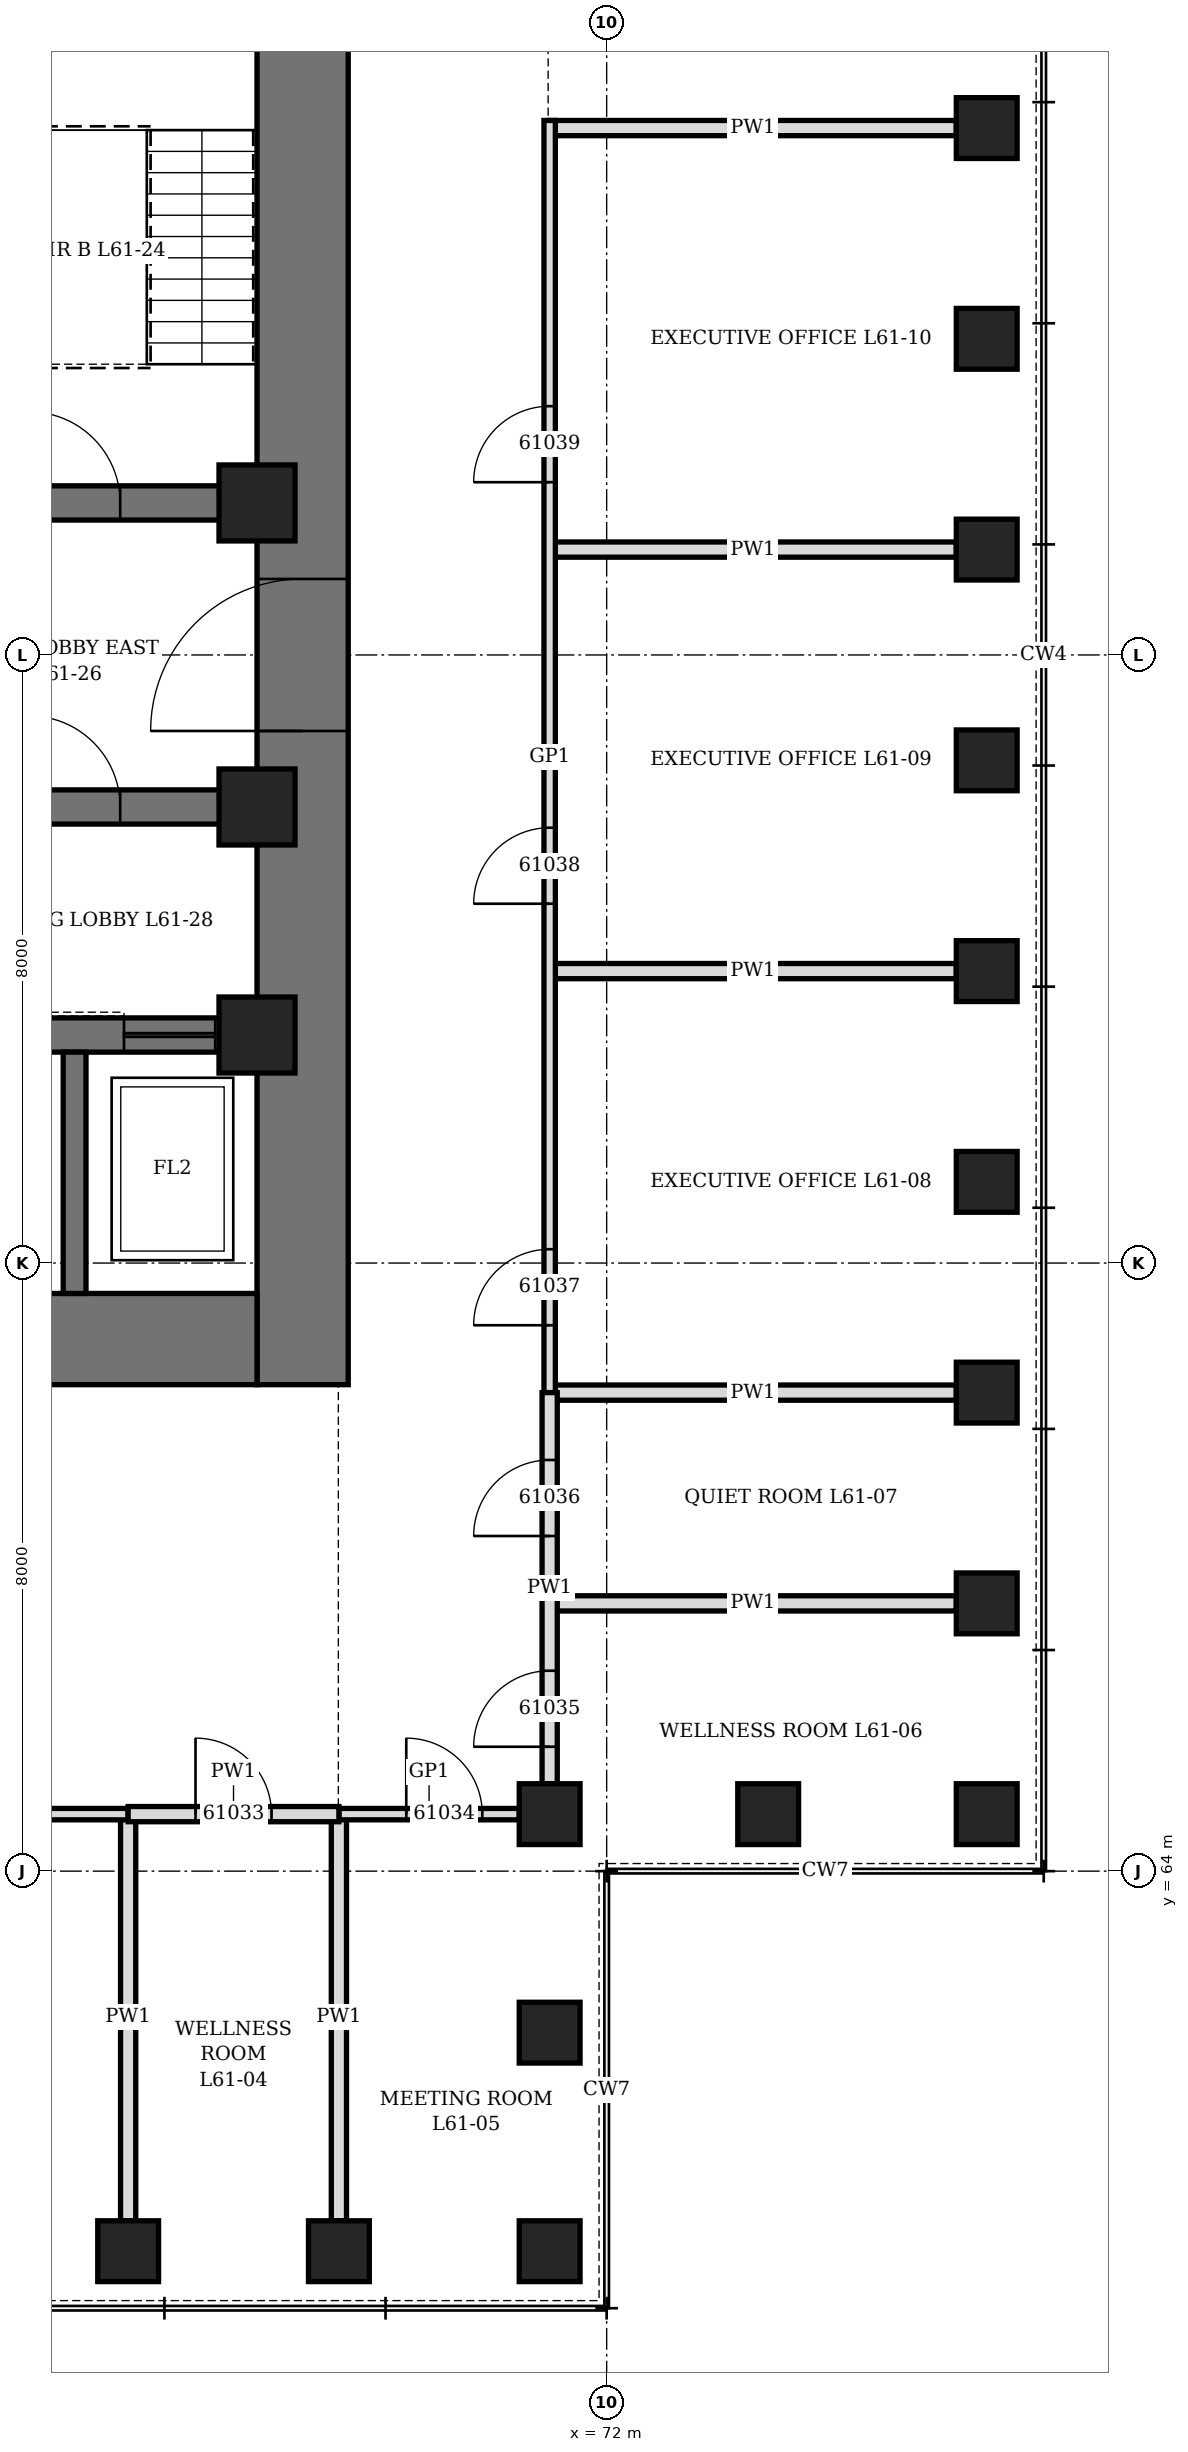
"""IFC4 building model, lengths in metres.
Left out: names, types, materials, properties, quantities, classifications, styles, units other than length and angle.
Written with IfcOpenShell. Run it as: python <this file> out.ifc"""

import sys

from ifc_helpers import new_model, si_unit, direction, frame, frame_2d, origin, origin_2d, place, context, subcontext, project, spatial, rectangle, hollow_rectangle, extrude, element, fill, save


model = new_model("IFC4")
c1 = context("Model", 3, precision=1e-05, world=origin(), true_north=direction((0.0, 1.0)))
c2 = subcontext(c1, "Body", "Model", "MODEL_VIEW")
j1 = project(units=[si_unit("LENGTHUNIT", "METRE"), si_unit("PLANEANGLEUNIT", "RADIAN")], contexts=[c1])
p1 = place(None, origin())
s1 = spatial("IfcSite", under=j1, at=p1, CompositionType="ELEMENT")
p2 = place(p1, origin())
s2 = spatial("IfcBuilding", under=s1, at=p2, CompositionType="ELEMENT")
p3 = place(p2, frame((0.0, 0.0, 271.3)))
s3 = spatial("IfcBuildingStorey", under=s2, at=p3, CompositionType="ELEMENT", Elevation=271.3)
for number, where, z_axis, x_axis in (
    (1, (65.705, 59.0, 0.0), (0.0, 0.0, 1.0), (1.0, 0.0, 0.0)),
    (2, (68.477, 59.0, 0.0), (0.0, 0.0, 1.0), (1.0, 0.0, 0.0)),
    (3, (71.25, 59.0, 0.0), (0.0, 0.0, 1.0), (0.0, 1.0, 0.0)),
    (4, (71.25, 61.875, 0.0), (0.0, 0.0, 1.0), (0.0, 1.0, 0.0)),
    (5, (71.25, 64.75, 0.0), (0.0, 0.0, 1.0), (1.0, 0.0, 0.0)),
    (6, (74.125, 64.75, 0.0), (0.0, 0.0, 1.0), (1.0, 0.0, 0.0)),
    (7, (77.0, 64.75, 0.0), (0.0, 0.0, 1.0), (0.0, 1.0, 0.0)),
    (8, (77.0, 67.523, 0.0), (0.0, 0.0, 1.0), (0.0, 1.0, 0.0)),
    (9, (77.0, 70.295, 0.0), (0.0, 0.0, 1.0), (0.0, 1.0, 0.0)),
    (10, (77.0, 73.068, 0.0), (0.0, 0.0, 1.0), (0.0, 1.0, 0.0)),
    (11, (77.0, 75.841, 0.0), (0.0, 0.0, 1.0), (0.0, 1.0, 0.0)),
    (12, (77.0, 78.614, 0.0), (0.0, 0.0, 1.0), (0.0, 1.0, 0.0)),
    (13, (77.0, 81.386, 0.0), (0.0, 0.0, 1.0), (0.0, 1.0, 0.0)),
    (14, (77.0, 84.159, 0.0), (0.0, 0.0, 1.0), (0.0, 1.0, 0.0)),
    (15, (77.0, 86.932, 0.0), (0.0, 0.0, 1.0), (0.0, 1.0, 0.0)),
):
    element("IfcColumn", number, at=place(p3, frame(where, z_axis=z_axis, x_axis=x_axis)), inside=s3, PredefinedType="COLUMN", context=c2, shape_type="SweptSolid", body=[
        extrude(hollow_rectangle(XDim=0.8, YDim=0.8, WallThickness=0.1, at=origin_2d()), origin(), (0.0, 0.0, 1.0), 4.2),
    ])
p4 = place(p3, frame((68.0, 70.4, 0.0), z_axis=(0.0, 0.0, 1.0), x_axis=(0.0, 1.0, 0.0)))
e16 = element("IfcWall", 16, at=p4, inside=s3, PredefinedType="SHEAR", context=c2, shape_type="SweptSolid", body=[
    extrude(rectangle(XDim=19.2, YDim=1.2, at=frame_2d((9.6, 0.0))), origin(), (0.0, 0.0, 1.0), 4.2),
])
p5 = place(p4, frame((8.6, 0.0, 0.0)))
e17 = element("IfcOpeningElement", 17, at=p5, cuts=e16, PredefinedType="OPENING", context=c2, shape_type="SweptSolid", body=[
    extrude(rectangle(XDim=2.0, YDim=2.4, at=frame_2d((1.0, 1.2))), frame((0.0, 0.61, 0.0), z_axis=(0.0, -1.0, 0.0), x_axis=(1.0, 0.0, 0.0)), (0.0, 0.0, 1.0), 1.22),
])
p6 = place(p3, frame((44.6, 71.0, 0.0), z_axis=(0.0, 0.0, 1.0), x_axis=(1.0, 0.0, 0.0)))
e18 = element("IfcWall", 18, at=p6, inside=s3, PredefinedType="SHEAR", context=c2, shape_type="SweptSolid", body=[
    extrude(rectangle(XDim=22.8, YDim=1.2, at=frame_2d((11.4, 0.0))), origin(), (0.0, 0.0, 1.0), 4.2),
])
p7 = place(p6, frame((6.35, 0.0, 0.0)))
e19 = element("IfcOpeningElement", 19, at=p7, cuts=e18, PredefinedType="OPENING", context=c2, shape_type="SweptSolid", body=[
    extrude(rectangle(XDim=1.1, YDim=2.2, at=frame_2d((0.55, 1.1))), frame((0.0, 0.61, 0.0), z_axis=(0.0, -1.0, 0.0), x_axis=(1.0, 0.0, 0.0)), (0.0, 0.0, 1.0), 1.22),
])
p8 = place(p6, frame((9.35, 0.0, 0.0)))
e20 = element("IfcOpeningElement", 20, at=p8, cuts=e18, PredefinedType="OPENING", context=c2, shape_type="SweptSolid", body=[
    extrude(rectangle(XDim=1.1, YDim=2.2, at=frame_2d((0.55, 1.1))), frame((0.0, 0.61, 0.0), z_axis=(0.0, -1.0, 0.0), x_axis=(1.0, 0.0, 0.0)), (0.0, 0.0, 1.0), 1.22),
])
p9 = place(p6, frame((12.35, 0.0, 0.0)))
e21 = element("IfcOpeningElement", 21, at=p9, cuts=e18, PredefinedType="OPENING", context=c2, shape_type="SweptSolid", body=[
    extrude(rectangle(XDim=1.1, YDim=2.2, at=frame_2d((0.55, 1.1))), frame((0.0, 0.61, 0.0), z_axis=(0.0, -1.0, 0.0), x_axis=(1.0, 0.0, 0.0)), (0.0, 0.0, 1.0), 1.22),
])
p10 = place(p6, frame((15.35, 0.0, 0.0)))
e22 = element("IfcOpeningElement", 22, at=p10, cuts=e18, PredefinedType="OPENING", context=c2, shape_type="SweptSolid", body=[
    extrude(rectangle(XDim=1.1, YDim=2.2, at=frame_2d((0.55, 1.1))), frame((0.0, 0.61, 0.0), z_axis=(0.0, -1.0, 0.0), x_axis=(1.0, 0.0, 0.0)), (0.0, 0.0, 1.0), 1.22),
])
p11 = place(p3, frame((62.225, 75.0, 0.0), z_axis=(0.0, 0.0, 1.0), x_axis=(1.0, 0.0, 0.0)))
e23 = element("IfcWall", 23, at=p11, inside=s3, PredefinedType="SHEAR", context=c2, shape_type="SweptSolid", body=[
    extrude(rectangle(XDim=5.175, YDim=0.45, at=frame_2d((2.587, 0.0))), origin(), (0.0, 0.0, 1.0), 4.2),
])
p12 = place(p11, frame((0.675, 0.0, 0.0)))
e24 = element("IfcOpeningElement", 24, at=p12, cuts=e23, PredefinedType="OPENING", context=c2, shape_type="SweptSolid", body=[
    extrude(rectangle(XDim=1.2, YDim=2.2, at=frame_2d((0.6, 1.1))), frame((0.0, 0.235, 0.0), z_axis=(0.0, -1.0, 0.0), x_axis=(1.0, 0.0, 0.0)), (0.0, 0.0, 1.0), 0.47),
])
p13 = place(p11, frame((3.425, 0.0, 0.0)))
e25 = element("IfcOpeningElement", 25, at=p13, cuts=e23, PredefinedType="OPENING", context=c2, shape_type="SweptSolid", body=[
    extrude(rectangle(XDim=1.2, YDim=2.2, at=frame_2d((0.6, 1.1))), frame((0.0, 0.235, 0.0), z_axis=(0.0, -1.0, 0.0), x_axis=(1.0, 0.0, 0.0)), (0.0, 0.0, 1.0), 0.47),
])
p14 = place(p3, frame((62.225, 78.0, 0.0), z_axis=(0.0, 0.0, 1.0), x_axis=(1.0, 0.0, 0.0)))
e26 = element("IfcWall", 26, at=p14, inside=s3, PredefinedType="SHEAR", context=c2, shape_type="SweptSolid", body=[
    extrude(rectangle(XDim=5.175, YDim=0.45, at=frame_2d((2.587, 0.0))), origin(), (0.0, 0.0, 1.0), 4.2),
])
p15 = place(p14, frame((2.175, 0.0, 0.0)))
e27 = element("IfcOpeningElement", 27, at=p15, cuts=e26, PredefinedType="OPENING", context=c2, shape_type="SweptSolid", body=[
    extrude(rectangle(XDim=1.2, YDim=2.1, at=frame_2d((0.6, 1.05))), frame((0.0, 0.235, 0.0), z_axis=(0.0, -1.0, 0.0), x_axis=(1.0, 0.0, 0.0)), (0.0, 0.0, 1.0), 0.47),
])
p16 = place(p3, frame((62.225, 82.0, 0.0), z_axis=(0.0, 0.0, 1.0), x_axis=(1.0, 0.0, 0.0)))
e28 = element("IfcWall", 28, at=p16, inside=s3, PredefinedType="SHEAR", context=c2, shape_type="SweptSolid", body=[
    extrude(rectangle(XDim=5.175, YDim=0.45, at=frame_2d((2.587, 0.0))), origin(), (0.0, 0.0, 1.0), 4.2),
])
p17 = place(p16, frame((2.175, 0.0, 0.0)))
e29 = element("IfcOpeningElement", 29, at=p17, cuts=e28, PredefinedType="OPENING", context=c2, shape_type="SweptSolid", body=[
    extrude(rectangle(XDim=1.2, YDim=2.1, at=frame_2d((0.6, 1.05))), frame((0.0, 0.235, 0.0), z_axis=(0.0, -1.0, 0.0), x_axis=(1.0, 0.0, 0.0)), (0.0, 0.0, 1.0), 0.47),
])
p18 = place(p3, frame((65.0, 71.6, 0.0), z_axis=(0.0, 0.0, 1.0), x_axis=(0.0, 1.0, 0.0)))
e30 = element("IfcWall", 30, at=p18, inside=s3, PredefinedType="SHEAR", context=c2, shape_type="SweptSolid", body=[
    extrude(rectangle(XDim=3.175, YDim=0.3, at=frame_2d((1.587, 0.0))), origin(), (0.0, 0.0, 1.0), 4.2),
])
for number, where, z_axis, x_axis in (
    (31, (67.4, 75.0, 0.0), (0.0, 0.0, 1.0), (1.0, 0.0, 0.0)),
    (32, (67.4, 78.0, 0.0), (0.0, 0.0, 1.0), (1.0, 0.0, 0.0)),
    (33, (67.4, 82.0, 0.0), (0.0, 0.0, 1.0), (1.0, 0.0, 0.0)),
):
    element("IfcColumn", number, at=place(p3, frame(where, z_axis=z_axis, x_axis=x_axis)), inside=s3, PredefinedType="COLUMN", context=c2, shape_type="SweptSolid", body=[
        extrude(hollow_rectangle(XDim=1.0, YDim=1.0, WallThickness=0.15, at=origin_2d()), origin(), (0.0, 0.0, 1.0), 4.2),
    ])
for number, where, z_axis, x_axis in (
    (34, (65.705, 59.4, 0.0), (0.0, 0.0, 1.0), (0.0, 1.0, 0.0)),
    (35, (68.477, 59.4, 0.0), (0.0, 0.0, 1.0), (0.0, 1.0, 0.0)),
    (36, (71.25, 67.523, 0.0), (0.0, 0.0, 1.0), (1.0, 0.0, 0.0)),
    (37, (71.25, 70.295, 0.0), (0.0, 0.0, 1.0), (1.0, 0.0, 0.0)),
    (38, (71.25, 75.841, 0.0), (0.0, 0.0, 1.0), (1.0, 0.0, 0.0)),
    (39, (71.25, 81.386, 0.0), (0.0, 0.0, 1.0), (1.0, 0.0, 0.0)),
    (40, (71.25, 86.932, 0.0), (0.0, 0.0, 1.0), (1.0, 0.0, 0.0)),
):
    element("IfcWall", number, at=place(p3, frame(where, z_axis=z_axis, x_axis=x_axis)), inside=s3, PredefinedType="PARTITIONING", context=c2, shape_type="SweptSolid", body=[
        extrude(rectangle(XDim=5.35, YDim=0.2, at=frame_2d((2.675, 0.0))), origin(), (0.0, 0.0, 1.0), 3.428),
    ])
p19 = place(p3, frame((60.059, 64.75, 0.0), z_axis=(0.0, 0.0, 1.0), x_axis=(1.0, 0.0, 0.0)))
e41 = element("IfcWall", 41, at=p19, inside=s3, PredefinedType="PARTITIONING", context=c2, shape_type="SweptSolid", body=[
    extrude(rectangle(XDim=5.646, YDim=0.15, at=frame_2d((2.823, 0.0))), origin(), (0.0, 0.0, 1.0), 4.04),
])
p20 = place(p19, frame((0.986, 0.0, 0.0)))
e42 = element("IfcOpeningElement", 42, at=p20, cuts=e41, PredefinedType="OPENING", context=c2, shape_type="SweptSolid", body=[
    extrude(rectangle(XDim=1.0, YDim=2.1, at=frame_2d((0.5, 1.05))), frame((0.0, 0.085, 0.0), z_axis=(0.0, -1.0, 0.0), x_axis=(1.0, 0.0, 0.0)), (0.0, 0.0, 1.0), 0.17),
])
p21 = place(p3, frame((68.477, 64.75, 0.0), z_axis=(0.0, 0.0, 1.0), x_axis=(1.0, 0.0, 0.0)))
e43 = element("IfcWall", 43, at=p21, inside=s3, PredefinedType="PARTITIONING", context=c2, shape_type="SweptSolid", body=[
    extrude(rectangle(XDim=2.373, YDim=0.15, at=frame_2d((1.187, 0.0))), origin(), (0.0, 0.0, 1.0), 4.04),
])
p22 = place(p21, frame((0.886, 0.0, 0.0)))
e44 = element("IfcOpeningElement", 44, at=p22, cuts=e43, PredefinedType="OPENING", context=c2, shape_type="SweptSolid", body=[
    extrude(rectangle(XDim=1.0, YDim=2.4, at=frame_2d((0.5, 1.2))), frame((0.0, 0.085, 0.0), z_axis=(0.0, -1.0, 0.0), x_axis=(1.0, 0.0, 0.0)), (0.0, 0.0, 1.0), 0.17),
])
p23 = place(p3, frame((65.705, 64.75, 0.0), z_axis=(0.0, 0.0, 1.0), x_axis=(1.0, 0.0, 0.0)))
e45 = element("IfcWall", 45, at=p23, inside=s3, PredefinedType="PARTITIONING", context=c2, shape_type="SweptSolid", body=[
    extrude(rectangle(XDim=2.773, YDim=0.2, at=frame_2d((1.386, 0.0))), origin(), (0.0, 0.0, 1.0), 4.04),
])
p24 = place(p23, frame((0.886, 0.0, 0.0)))
e46 = element("IfcOpeningElement", 46, at=p24, cuts=e45, PredefinedType="OPENING", context=c2, shape_type="SweptSolid", body=[
    extrude(rectangle(XDim=1.0, YDim=2.1, at=frame_2d((0.5, 1.05))), frame((0.0, 0.11, 0.0), z_axis=(0.0, -1.0, 0.0), x_axis=(1.0, 0.0, 0.0)), (0.0, 0.0, 1.0), 0.22),
])
p25 = place(p3, frame((71.25, 70.295, 0.0), z_axis=(0.0, 0.0, 1.0), x_axis=(0.0, 1.0, 0.0)))
e47 = element("IfcWall", 47, at=p25, inside=s3, PredefinedType="PARTITIONING", context=c2, shape_type="SweptSolid", body=[
    extrude(rectangle(XDim=16.736, YDim=0.15, at=frame_2d((8.368, 0.0))), origin(), (0.0, 0.0, 1.0), 4.04),
])
p26 = place(p25, frame((0.886, 0.0, 0.0)))
e48 = element("IfcOpeningElement", 48, at=p26, cuts=e47, PredefinedType="OPENING", context=c2, shape_type="SweptSolid", body=[
    extrude(rectangle(XDim=1.0, YDim=2.1, at=frame_2d((0.5, 1.05))), frame((0.0, 0.085, 0.0), z_axis=(0.0, -1.0, 0.0), x_axis=(1.0, 0.0, 0.0)), (0.0, 0.0, 1.0), 0.17),
])
p27 = place(p25, frame((6.432, 0.0, 0.0)))
e49 = element("IfcOpeningElement", 49, at=p27, cuts=e47, PredefinedType="OPENING", context=c2, shape_type="SweptSolid", body=[
    extrude(rectangle(XDim=1.0, YDim=2.1, at=frame_2d((0.5, 1.05))), frame((0.0, 0.085, 0.0), z_axis=(0.0, -1.0, 0.0), x_axis=(1.0, 0.0, 0.0)), (0.0, 0.0, 1.0), 0.17),
])
p28 = place(p25, frame((11.977, 0.0, 0.0)))
e50 = element("IfcOpeningElement", 50, at=p28, cuts=e47, PredefinedType="OPENING", context=c2, shape_type="SweptSolid", body=[
    extrude(rectangle(XDim=1.0, YDim=2.1, at=frame_2d((0.5, 1.05))), frame((0.0, 0.085, 0.0), z_axis=(0.0, -1.0, 0.0), x_axis=(1.0, 0.0, 0.0)), (0.0, 0.0, 1.0), 0.17),
])
p29 = place(p3, frame((71.25, 65.15, 0.0), z_axis=(0.0, 0.0, 1.0), x_axis=(0.0, 1.0, 0.0)))
e51 = element("IfcWall", 51, at=p29, inside=s3, PredefinedType="PARTITIONING", context=c2, shape_type="SweptSolid", body=[
    extrude(rectangle(XDim=5.146, YDim=0.2, at=frame_2d((2.573, 0.0))), origin(), (0.0, 0.0, 1.0), 4.04),
])
p30 = place(p29, frame((0.486, 0.0, 0.0)))
e52 = element("IfcOpeningElement", 52, at=p30, cuts=e51, PredefinedType="OPENING", context=c2, shape_type="SweptSolid", body=[
    extrude(rectangle(XDim=1.0, YDim=2.1, at=frame_2d((0.5, 1.05))), frame((0.0, 0.11, 0.0), z_axis=(0.0, -1.0, 0.0), x_axis=(1.0, 0.0, 0.0)), (0.0, 0.0, 1.0), 0.22),
])
p31 = place(p29, frame((3.259, 0.0, 0.0)))
e53 = element("IfcOpeningElement", 53, at=p31, cuts=e51, PredefinedType="OPENING", context=c2, shape_type="SweptSolid", body=[
    extrude(rectangle(XDim=1.0, YDim=2.1, at=frame_2d((0.5, 1.05))), frame((0.0, 0.11, 0.0), z_axis=(0.0, -1.0, 0.0), x_axis=(1.0, 0.0, 0.0)), (0.0, 0.0, 1.0), 0.22),
])
p32 = place(p17, origin())
e54 = element("IfcDoor", 54, at=p32, inside=s3, OperationType="SINGLE_SWING_LEFT", PredefinedType="DOOR", context=c2, shape_type="SweptSolid", body=[
    extrude(rectangle(XDim=1.2, YDim=2.1, at=frame_2d((0.6, 1.05))), frame((0.0, 0.225, 0.0), z_axis=(0.0, -1.0, 0.0), x_axis=(1.0, 0.0, 0.0)), (0.0, 0.0, 1.0), 0.449),
])
fill(e29, e54)
p33 = place(p5, origin())
e55 = element("IfcDoor", 55, at=p33, inside=s3, OperationType="DOUBLE_DOOR_SINGLE_SWING", PredefinedType="DOOR", context=c2, shape_type="SweptSolid", body=[
    extrude(rectangle(XDim=2.0, YDim=2.4, at=frame_2d((1.0, 1.2))), frame((0.0, 0.35, 0.0), z_axis=(0.0, -1.0, 0.0), x_axis=(1.0, 0.0, 0.0)), (0.0, 0.0, 1.0), 0.7),
])
fill(e17, e55)
p34 = place(p15, origin())
e56 = element("IfcDoor", 56, at=p34, inside=s3, OperationType="SINGLE_SWING_RIGHT", PredefinedType="DOOR", context=c2, shape_type="SweptSolid", body=[
    extrude(rectangle(XDim=1.2, YDim=2.1, at=frame_2d((0.6, 1.05))), frame((0.0, 0.225, 0.0), z_axis=(0.0, -1.0, 0.0), x_axis=(1.0, 0.0, 0.0)), (0.0, 0.0, 1.0), 0.449),
])
fill(e27, e56)
p35 = place(p13, origin())
e57 = element("IfcDoor", 57, at=p35, inside=s3, OperationType="SLIDING_TO_LEFT", PredefinedType="DOOR", context=c2, shape_type="SweptSolid", body=[
    extrude(rectangle(XDim=1.2, YDim=2.2, at=frame_2d((0.6, 1.1))), frame((0.0, 0.225, 0.0), z_axis=(0.0, -1.0, 0.0), x_axis=(1.0, 0.0, 0.0)), (0.0, 0.0, 1.0), 0.449),
])
fill(e25, e57)
p36 = place(p24, origin())
e58 = element("IfcDoor", 58, at=p36, inside=s3, OperationType="SINGLE_SWING_LEFT", PredefinedType="DOOR", context=c2, shape_type="SweptSolid", body=[
    extrude(rectangle(XDim=1.0, YDim=2.1, at=frame_2d((0.5, 1.05))), frame((0.0, 0.1, 0.0), z_axis=(0.0, -1.0, 0.0), x_axis=(1.0, 0.0, 0.0)), (0.0, 0.0, 1.0), 0.199),
])
fill(e46, e58)
p37 = place(p22, origin())
e59 = element("IfcDoor", 59, at=p37, inside=s3, OperationType="SINGLE_SWING_RIGHT", PredefinedType="DOOR", context=c2, shape_type="SweptSolid", body=[
    extrude(rectangle(XDim=1.0, YDim=2.4, at=frame_2d((0.5, 1.2))), frame((0.0, 0.075, 0.0), z_axis=(0.0, -1.0, 0.0), x_axis=(1.0, 0.0, 0.0)), (0.0, 0.0, 1.0), 0.149),
])
fill(e44, e59)
p38 = place(p30, origin())
e60 = element("IfcDoor", 60, at=p38, inside=s3, OperationType="SINGLE_SWING_LEFT", PredefinedType="DOOR", context=c2, shape_type="SweptSolid", body=[
    extrude(rectangle(XDim=1.0, YDim=2.1, at=frame_2d((0.5, 1.05))), frame((0.0, 0.1, 0.0), z_axis=(0.0, -1.0, 0.0), x_axis=(1.0, 0.0, 0.0)), (0.0, 0.0, 1.0), 0.199),
])
fill(e52, e60)
p39 = place(p31, origin())
e61 = element("IfcDoor", 61, at=p39, inside=s3, OperationType="SINGLE_SWING_LEFT", PredefinedType="DOOR", context=c2, shape_type="SweptSolid", body=[
    extrude(rectangle(XDim=1.0, YDim=2.1, at=frame_2d((0.5, 1.05))), frame((0.0, 0.1, 0.0), z_axis=(0.0, -1.0, 0.0), x_axis=(1.0, 0.0, 0.0)), (0.0, 0.0, 1.0), 0.199),
])
fill(e53, e61)
p40 = place(p26, origin())
e62 = element("IfcDoor", 62, at=p40, inside=s3, OperationType="SINGLE_SWING_LEFT", PredefinedType="DOOR", context=c2, shape_type="SweptSolid", body=[
    extrude(rectangle(XDim=1.0, YDim=2.1, at=frame_2d((0.5, 1.05))), frame((0.0, 0.075, 0.0), z_axis=(0.0, -1.0, 0.0), x_axis=(1.0, 0.0, 0.0)), (0.0, 0.0, 1.0), 0.149),
])
fill(e48, e62)
p41 = place(p27, origin())
e63 = element("IfcDoor", 63, at=p41, inside=s3, OperationType="SINGLE_SWING_LEFT", PredefinedType="DOOR", context=c2, shape_type="SweptSolid", body=[
    extrude(rectangle(XDim=1.0, YDim=2.1, at=frame_2d((0.5, 1.05))), frame((0.0, 0.075, 0.0), z_axis=(0.0, -1.0, 0.0), x_axis=(1.0, 0.0, 0.0)), (0.0, 0.0, 1.0), 0.149),
])
fill(e49, e63)
p42 = place(p28, origin())
e64 = element("IfcDoor", 64, at=p42, inside=s3, OperationType="SINGLE_SWING_LEFT", PredefinedType="DOOR", context=c2, shape_type="SweptSolid", body=[
    extrude(rectangle(XDim=1.0, YDim=2.1, at=frame_2d((0.5, 1.05))), frame((0.0, 0.075, 0.0), z_axis=(0.0, -1.0, 0.0), x_axis=(1.0, 0.0, 0.0)), (0.0, 0.0, 1.0), 0.149),
])
fill(e50, e64)
save(model, sys.argv[1])
